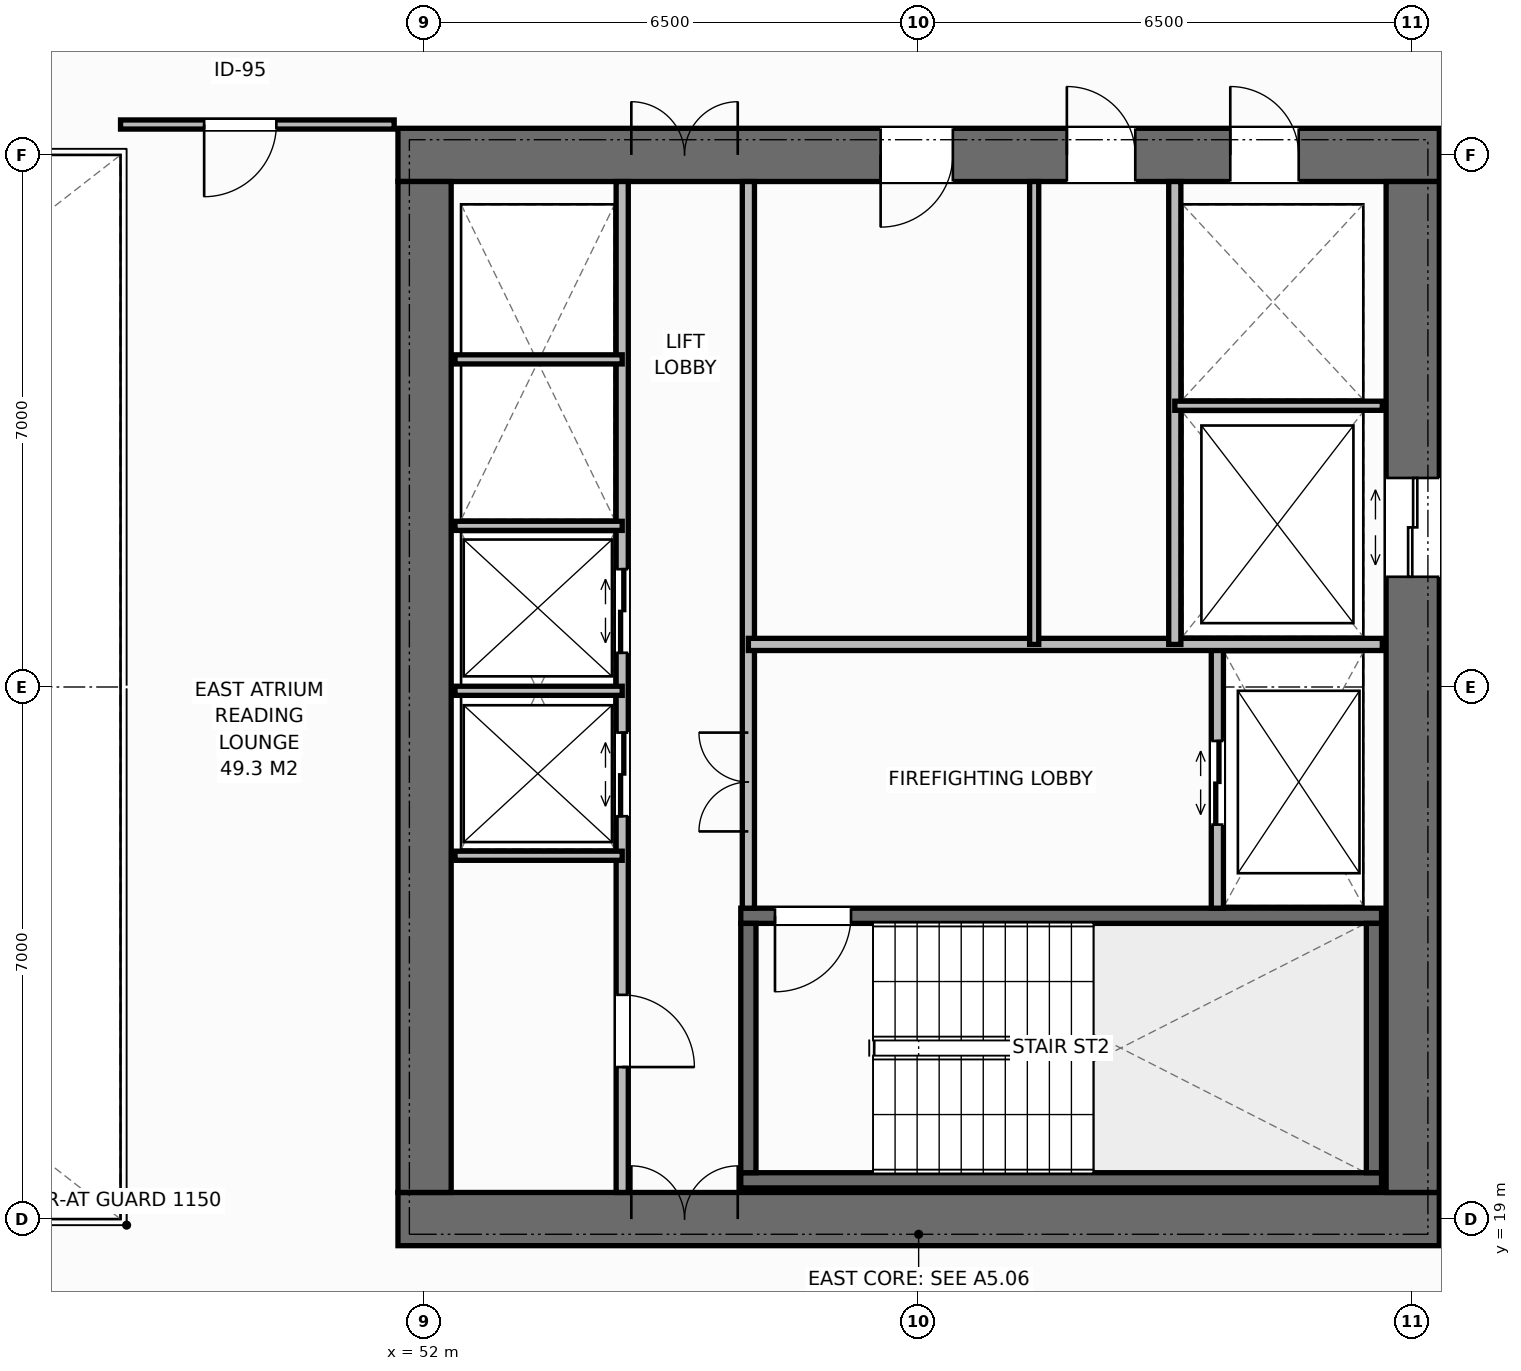
"""IFC4 building model, lengths in metres.
Left out: names, types, materials, properties, quantities, classifications, styles, units other than length and angle.
Written with IfcOpenShell. Run it as: python <this file> out.ifc"""

import sys

from ifc_helpers import new_model, si_unit, direction, frame, frame_2d, origin, place, context, subcontext, project, spatial, rectangle, extrude, element, fill, save


model = new_model("IFC4")
c1 = context("Model", 3, precision=1e-05, world=origin(), true_north=direction((0.0, 1.0)))
c2 = subcontext(c1, "Body", "Model", "MODEL_VIEW")
j1 = project(units=[si_unit("LENGTHUNIT", "METRE"), si_unit("PLANEANGLEUNIT", "RADIAN")], contexts=[c1])
p1 = place(None, origin())
s1 = spatial("IfcSite", under=j1, at=p1, CompositionType="ELEMENT")
p2 = place(p1, origin())
s2 = spatial("IfcBuilding", under=s1, at=p2, CompositionType="ELEMENT")
p3 = place(p2, frame((0.0, 0.0, 120.2)))
s3 = spatial("IfcBuildingStorey", under=s2, at=p3, CompositionType="ELEMENT", Elevation=120.2)
p4 = place(p3, frame((51.65, 19.0, 0.0), z_axis=(0.0, 0.0, 1.0), x_axis=(1.0, 0.0, 0.0)))
e1 = element("IfcWall", 1, at=p4, inside=s3, PredefinedType="SHEAR", context=c2, shape_type="SweptSolid", body=[
    extrude(rectangle(XDim=13.7, YDim=0.7, at=frame_2d((6.85, 0.0))), origin(), (0.0, 0.0, 1.0), 3.8),
])
p5 = place(p4, frame((3.07, 0.0, 0.0)))
e2 = element("IfcOpeningElement", 2, at=p5, cuts=e1, PredefinedType="OPENING", context=c2, shape_type="SweptSolid", body=[
    extrude(rectangle(XDim=1.4, YDim=2.2, at=frame_2d((0.7, 1.1))), frame((0.0, 0.36, 0.0), z_axis=(0.0, -1.0, 0.0), x_axis=(1.0, 0.0, 0.0)), (0.0, 0.0, 1.0), 0.72),
])
p6 = place(p3, frame((51.65, 33.0, 0.0), z_axis=(0.0, 0.0, 1.0), x_axis=(1.0, 0.0, 0.0)))
e3 = element("IfcWall", 3, at=p6, inside=s3, PredefinedType="SHEAR", context=c2, shape_type="SweptSolid", body=[
    extrude(rectangle(XDim=13.7, YDim=0.7, at=frame_2d((6.85, 0.0))), origin(), (0.0, 0.0, 1.0), 3.8),
])
p7 = place(p6, frame((3.07, 0.0, 0.0)))
e4 = element("IfcOpeningElement", 4, at=p7, cuts=e3, PredefinedType="OPENING", context=c2, shape_type="SweptSolid", body=[
    extrude(rectangle(XDim=1.4, YDim=2.2, at=frame_2d((0.7, 1.1))), frame((0.0, 0.36, 0.0), z_axis=(0.0, -1.0, 0.0), x_axis=(1.0, 0.0, 0.0)), (0.0, 0.0, 1.0), 0.72),
])
p8 = place(p6, frame((10.95, 0.0, 0.0)))
e5 = element("IfcOpeningElement", 5, at=p8, cuts=e3, PredefinedType="OPENING", context=c2, shape_type="SweptSolid", body=[
    extrude(rectangle(XDim=0.9, YDim=2.15, at=frame_2d((0.45, 1.075))), frame((0.0, 0.36, 0.0), z_axis=(0.0, -1.0, 0.0), x_axis=(1.0, 0.0, 0.0)), (0.0, 0.0, 1.0), 0.72),
])
p9 = place(p6, frame((6.35, 0.0, 0.0)))
e6 = element("IfcOpeningElement", 6, at=p9, cuts=e3, PredefinedType="OPENING", context=c2, shape_type="SweptSolid", body=[
    extrude(rectangle(XDim=0.95, YDim=2.15, at=frame_2d((0.475, 1.075))), frame((0.0, 0.36, 0.0), z_axis=(0.0, -1.0, 0.0), x_axis=(1.0, 0.0, 0.0)), (0.0, 0.0, 1.0), 0.72),
])
p10 = place(p6, frame((8.8, 0.0, 0.0)))
e7 = element("IfcOpeningElement", 7, at=p10, cuts=e3, PredefinedType="OPENING", context=c2, shape_type="SweptSolid", body=[
    extrude(rectangle(XDim=0.9, YDim=2.15, at=frame_2d((0.45, 1.075))), frame((0.0, 0.36, 0.0), z_axis=(0.0, -1.0, 0.0), x_axis=(1.0, 0.0, 0.0)), (0.0, 0.0, 1.0), 0.72),
])
p11 = place(p3, frame((52.0, 19.35, 0.0), z_axis=(0.0, 0.0, 1.0), x_axis=(0.0, 1.0, 0.0)))
e8 = element("IfcWall", 8, at=p11, inside=s3, PredefinedType="SHEAR", context=c2, shape_type="SweptSolid", body=[
    extrude(rectangle(XDim=13.3, YDim=0.7, at=frame_2d((6.65, 0.0))), origin(), (0.0, 0.0, 1.0), 3.8),
])
p12 = place(p3, frame((65.0, 19.35, 0.0), z_axis=(0.0, 0.0, 1.0), x_axis=(0.0, 1.0, 0.0)))
e9 = element("IfcWall", 9, at=p12, inside=s3, PredefinedType="SHEAR", context=c2, shape_type="SweptSolid", body=[
    extrude(rectangle(XDim=13.3, YDim=0.7, at=frame_2d((6.65, 0.0))), origin(), (0.0, 0.0, 1.0), 3.8),
])
p13 = place(p12, frame((8.1, 0.0, 0.0)))
e10 = element("IfcOpeningElement", 10, at=p13, cuts=e9, PredefinedType="OPENING", context=c2, shape_type="SweptSolid", body=[
    extrude(rectangle(XDim=1.3, YDim=2.2, at=frame_2d((0.65, 1.1))), frame((0.0, 0.36, 0.0), z_axis=(0.0, -1.0, 0.0), x_axis=(1.0, 0.0, 0.0)), (0.0, 0.0, 1.0), 0.72),
])
p14 = place(p3, frame((56.16, 19.51, 0.0), z_axis=(0.0, 0.0, 1.0), x_axis=(1.0, 0.0, 0.0)))
e11 = element("IfcWall", 11, at=p14, inside=s3, PredefinedType="SHEAR", context=c2, shape_type="SweptSolid", body=[
    extrude(rectangle(XDim=8.43, YDim=0.2, at=frame_2d((4.215, 0.0))), origin(), (0.0, 0.0, 1.0), 3.8),
])
p15 = place(p3, frame((56.16, 22.99, 0.0), z_axis=(0.0, 0.0, 1.0), x_axis=(1.0, 0.0, 0.0)))
e12 = element("IfcWall", 12, at=p15, inside=s3, PredefinedType="SHEAR", context=c2, shape_type="SweptSolid", body=[
    extrude(rectangle(XDim=8.43, YDim=0.2, at=frame_2d((4.215, 0.0))), origin(), (0.0, 0.0, 1.0), 3.8),
])
p16 = place(p15, frame((0.45, 0.0, 0.0)))
e13 = element("IfcOpeningElement", 13, at=p16, cuts=e12, PredefinedType="OPENING", context=c2, shape_type="SweptSolid", body=[
    extrude(rectangle(XDim=1.0, YDim=2.15, at=frame_2d((0.5, 1.075))), frame((0.0, 0.11, 0.0), z_axis=(0.0, -1.0, 0.0), x_axis=(1.0, 0.0, 0.0)), (0.0, 0.0, 1.0), 0.22),
])
for number, where, z_axis, x_axis in (
    (14, (56.26, 19.61, 0.0), (0.0, 0.0, 1.0), (0.0, 1.0, 0.0)),
    (15, (64.49, 19.61, 0.0), (0.0, 0.0, 1.0), (0.0, 1.0, 0.0)),
):
    element("IfcWall", number, at=place(p3, frame(where, z_axis=z_axis, x_axis=x_axis)), inside=s3, PredefinedType="SHEAR", context=c2, shape_type="SweptSolid", body=[
        extrude(rectangle(XDim=3.28, YDim=0.2, at=frame_2d((1.64, 0.0))), origin(), (0.0, 0.0, 1.0), 3.8),
    ])
p17 = place(p3, frame((54.6, 19.35, 0.0), z_axis=(0.0, 0.0, 1.0), x_axis=(0.0, 1.0, 0.0)))
e16 = element("IfcWall", 16, at=p17, inside=s3, PredefinedType="STANDARD", context=c2, shape_type="SweptSolid", body=[
    extrude(rectangle(XDim=13.3, YDim=0.16, at=frame_2d((6.65, 0.0))), origin(), (0.0, 0.0, 1.0), 3.565),
])
p18 = place(p17, frame((1.65, 0.0, 0.0)))
e17 = element("IfcOpeningElement", 17, at=p18, cuts=e16, PredefinedType="OPENING", context=c2, shape_type="SweptSolid", body=[
    extrude(rectangle(XDim=0.95, YDim=2.15, at=frame_2d((0.475, 1.075))), frame((0.0, 0.09, 0.0), z_axis=(0.0, -1.0, 0.0), x_axis=(1.0, 0.0, 0.0)), (0.0, 0.0, 1.0), 0.18),
])
p19 = place(p17, frame((4.95, 0.0, 0.0)))
e18 = element("IfcOpeningElement", 18, at=p19, cuts=e16, PredefinedType="OPENING", context=c2, shape_type="SweptSolid", body=[
    extrude(rectangle(XDim=1.1, YDim=2.2, at=frame_2d((0.55, 1.1))), frame((0.0, 0.09, 0.0), z_axis=(0.0, -1.0, 0.0), x_axis=(1.0, 0.0, 0.0)), (0.0, 0.0, 1.0), 0.18),
])
p20 = place(p17, frame((7.1, 0.0, 0.0)))
e19 = element("IfcOpeningElement", 19, at=p20, cuts=e16, PredefinedType="OPENING", context=c2, shape_type="SweptSolid", body=[
    extrude(rectangle(XDim=1.1, YDim=2.2, at=frame_2d((0.55, 1.1))), frame((0.0, 0.09, 0.0), z_axis=(0.0, -1.0, 0.0), x_axis=(1.0, 0.0, 0.0)), (0.0, 0.0, 1.0), 0.18),
])
p21 = place(p3, frame((56.26, 23.09, 0.0), z_axis=(0.0, 0.0, 1.0), x_axis=(0.0, 1.0, 0.0)))
e20 = element("IfcWall", 20, at=p21, inside=s3, PredefinedType="STANDARD", context=c2, shape_type="SweptSolid", body=[
    extrude(rectangle(XDim=9.56, YDim=0.16, at=frame_2d((4.78, 0.0))), origin(), (0.0, 0.0, 1.0), 3.565),
])
p22 = place(p21, frame((1.01, 0.0, 0.0)))
e21 = element("IfcOpeningElement", 21, at=p22, cuts=e20, PredefinedType="OPENING", context=c2, shape_type="SweptSolid", body=[
    extrude(rectangle(XDim=1.3, YDim=2.2, at=frame_2d((0.65, 1.1))), frame((0.0, 0.09, 0.0), z_axis=(0.0, -1.0, 0.0), x_axis=(1.0, 0.0, 0.0)), (0.0, 0.0, 1.0), 0.18),
])
for number, where, z_axis, x_axis in (
    (22, (52.4, 23.78, 0.0), (0.0, 0.0, 1.0), (1.0, 0.0, 0.0)),
    (23, (52.4, 25.95, 0.0), (0.0, 0.0, 1.0), (1.0, 0.0, 0.0)),
    (24, (52.4, 28.12, 0.0), (0.0, 0.0, 1.0), (1.0, 0.0, 0.0)),
    (25, (52.4, 30.31, 0.0), (0.0, 0.0, 1.0), (1.0, 0.0, 0.0)),
):
    element("IfcWall", number, at=place(p3, frame(where, z_axis=z_axis, x_axis=x_axis)), inside=s3, PredefinedType="PARTITIONING", context=c2, shape_type="SweptSolid", body=[
        extrude(rectangle(XDim=2.2, YDim=0.12, at=frame_2d((1.1, 0.0))), origin(), (0.0, 0.0, 1.0), 3.565),
    ])
p23 = place(p3, frame((62.43, 23.09, 0.0), z_axis=(0.0, 0.0, 1.0), x_axis=(0.0, 1.0, 0.0)))
e26 = element("IfcWall", 26, at=p23, inside=s3, PredefinedType="STANDARD", context=c2, shape_type="SweptSolid", body=[
    extrude(rectangle(XDim=3.47, YDim=0.16, at=frame_2d((1.735, 0.0))), origin(), (0.0, 0.0, 1.0), 3.565),
])
p24 = place(p23, frame((1.1, 0.0, 0.0)))
e27 = element("IfcOpeningElement", 27, at=p24, cuts=e26, PredefinedType="OPENING", context=c2, shape_type="SweptSolid", body=[
    extrude(rectangle(XDim=1.1, YDim=2.2, at=frame_2d((0.55, 1.1))), frame((0.0, 0.09, 0.0), z_axis=(0.0, -1.0, 0.0), x_axis=(1.0, 0.0, 0.0)), (0.0, 0.0, 1.0), 0.18),
])
p25 = place(p3, frame((56.26, 26.56, 0.0), z_axis=(0.0, 0.0, 1.0), x_axis=(1.0, 0.0, 0.0)))
e28 = element("IfcWall", 28, at=p25, inside=s3, PredefinedType="STANDARD", context=c2, shape_type="SweptSolid", body=[
    extrude(rectangle(XDim=8.34, YDim=0.16, at=frame_2d((4.17, 0.0))), origin(), (0.0, 0.0, 1.0), 3.565),
])
p26 = place(p3, frame((61.87, 26.56, 0.0), z_axis=(0.0, 0.0, 1.0), x_axis=(0.0, 1.0, 0.0)))
e29 = element("IfcWall", 29, at=p26, inside=s3, PredefinedType="STANDARD", context=c2, shape_type="SweptSolid", body=[
    extrude(rectangle(XDim=6.09, YDim=0.16, at=frame_2d((3.045, 0.0))), origin(), (0.0, 0.0, 1.0), 3.565),
])
p27 = place(p3, frame((61.87, 29.7, 0.0), z_axis=(0.0, 0.0, 1.0), x_axis=(1.0, 0.0, 0.0)))
e30 = element("IfcWall", 30, at=p27, inside=s3, PredefinedType="PARTITIONING", context=c2, shape_type="SweptSolid", body=[
    extrude(rectangle(XDim=2.73, YDim=0.12, at=frame_2d((1.365, 0.0))), origin(), (0.0, 0.0, 1.0), 3.565),
])
p28 = place(p3, frame((60.02, 26.56, 0.0), z_axis=(0.0, 0.0, 1.0), x_axis=(0.0, 1.0, 0.0)))
e31 = element("IfcWall", 31, at=p28, inside=s3, PredefinedType="PARTITIONING", context=c2, shape_type="SweptSolid", body=[
    extrude(rectangle(XDim=6.09, YDim=0.12, at=frame_2d((3.045, 0.0))), origin(), (0.0, 0.0, 1.0), 3.565),
])
p29 = place(p3, frame((48.0, 33.4, 0.0), z_axis=(0.0, 0.0, 1.0), x_axis=(1.0, 0.0, 0.0)))
e32 = element("IfcWall", 32, at=p29, inside=s3, PredefinedType="PARTITIONING", context=c2, shape_type="SweptSolid", body=[
    extrude(rectangle(XDim=3.6, YDim=0.12, at=frame_2d((1.8, 0.0))), origin(), (0.0, 0.0, 1.0), 3.565),
])
p30 = place(p29, frame((1.1, 0.0, 0.0)))
e33 = element("IfcOpeningElement", 33, at=p30, cuts=e32, PredefinedType="OPENING", context=c2, shape_type="SweptSolid", body=[
    extrude(rectangle(XDim=0.95, YDim=2.15, at=frame_2d((0.475, 1.075))), frame((0.0, 0.07, 0.0), z_axis=(0.0, -1.0, 0.0), x_axis=(1.0, 0.0, 0.0)), (0.0, 0.0, 1.0), 0.14),
])
p31 = place(p5, origin())
e34 = element("IfcDoor", 34, at=p31, inside=s3, OperationType="DOUBLE_DOOR_SINGLE_SWING", PredefinedType="DOOR", context=c2, shape_type="SweptSolid", body=[
    extrude(rectangle(XDim=1.4, YDim=2.2, at=frame_2d((0.7, 1.1))), frame((0.0, 0.125, 0.0), z_axis=(0.0, -1.0, 0.0), x_axis=(1.0, 0.0, 0.0)), (0.0, 0.0, 1.0), 0.05),
])
fill(e2, e34)
p32 = place(p7, origin())
e35 = element("IfcDoor", 35, at=p32, inside=s3, OperationType="DOUBLE_DOOR_SINGLE_SWING", PredefinedType="DOOR", context=c2, shape_type="SweptSolid", body=[
    extrude(rectangle(XDim=1.4, YDim=2.2, at=frame_2d((0.7, 1.1))), frame((0.0, -0.075, 0.0), z_axis=(0.0, -1.0, 0.0), x_axis=(1.0, 0.0, 0.0)), (0.0, 0.0, 1.0), 0.05),
])
fill(e4, e35)
p33 = place(p18, origin())
e36 = element("IfcDoor", 36, at=p33, inside=s3, OperationType="SINGLE_SWING_RIGHT", PredefinedType="DOOR", context=c2, shape_type="SweptSolid", body=[
    extrude(rectangle(XDim=0.95, YDim=2.15, at=frame_2d((0.475, 1.075))), frame((0.0, 0.025, 0.0), z_axis=(0.0, -1.0, 0.0), x_axis=(1.0, 0.0, 0.0)), (0.0, 0.0, 1.0), 0.05),
])
fill(e17, e36)
p34 = place(p19, origin())
e37 = element("IfcDoor", 37, at=p34, inside=s3, OperationType="DOUBLE_DOOR_SLIDING", PredefinedType="DOOR", context=c2, shape_type="SweptSolid", body=[
    extrude(rectangle(XDim=1.1, YDim=2.2, at=frame_2d((0.55, 1.1))), frame((0.0, 0.025, 0.0), z_axis=(0.0, -1.0, 0.0), x_axis=(1.0, 0.0, 0.0)), (0.0, 0.0, 1.0), 0.05),
])
fill(e18, e37)
p35 = place(p20, origin())
e38 = element("IfcDoor", 38, at=p35, inside=s3, OperationType="DOUBLE_DOOR_SLIDING", PredefinedType="DOOR", context=c2, shape_type="SweptSolid", body=[
    extrude(rectangle(XDim=1.1, YDim=2.2, at=frame_2d((0.55, 1.1))), frame((0.0, 0.025, 0.0), z_axis=(0.0, -1.0, 0.0), x_axis=(1.0, 0.0, 0.0)), (0.0, 0.0, 1.0), 0.05),
])
fill(e19, e38)
p36 = place(p16, origin())
e39 = element("IfcDoor", 39, at=p36, inside=s3, OperationType="SINGLE_SWING_RIGHT", PredefinedType="DOOR", context=c2, shape_type="SweptSolid", body=[
    extrude(rectangle(XDim=1.0, YDim=2.15, at=frame_2d((0.5, 1.075))), frame((0.0, 0.025, 0.0), z_axis=(0.0, -1.0, 0.0), x_axis=(1.0, 0.0, 0.0)), (0.0, 0.0, 1.0), 0.05),
])
fill(e13, e39)
p37 = place(p24, origin())
e40 = element("IfcDoor", 40, at=p37, inside=s3, OperationType="DOUBLE_DOOR_SLIDING", PredefinedType="DOOR", context=c2, shape_type="SweptSolid", body=[
    extrude(rectangle(XDim=1.1, YDim=2.2, at=frame_2d((0.55, 1.1))), frame((0.0, 0.025, 0.0), z_axis=(0.0, -1.0, 0.0), x_axis=(1.0, 0.0, 0.0)), (0.0, 0.0, 1.0), 0.05),
])
fill(e27, e40)
p38 = place(p22, origin())
e41 = element("IfcDoor", 41, at=p38, inside=s3, OperationType="DOUBLE_DOOR_SINGLE_SWING", PredefinedType="DOOR", context=c2, shape_type="SweptSolid", body=[
    extrude(rectangle(XDim=1.3, YDim=2.2, at=frame_2d((0.65, 1.1))), frame((0.0, 0.025, 0.0), z_axis=(0.0, -1.0, 0.0), x_axis=(1.0, 0.0, 0.0)), (0.0, 0.0, 1.0), 0.05),
])
fill(e21, e41)
p39 = place(p13, origin())
e42 = element("IfcDoor", 42, at=p39, inside=s3, OperationType="DOUBLE_DOOR_SLIDING", PredefinedType="DOOR", context=c2, shape_type="SweptSolid", body=[
    extrude(rectangle(XDim=1.3, YDim=2.2, at=frame_2d((0.65, 1.1))), frame((0.0, 0.025, 0.0), z_axis=(0.0, -1.0, 0.0), x_axis=(1.0, 0.0, 0.0)), (0.0, 0.0, 1.0), 0.05),
])
fill(e10, e42)
p40 = place(p8, origin())
e43 = element("IfcDoor", 43, at=p40, inside=s3, OperationType="SINGLE_SWING_LEFT", PredefinedType="DOOR", context=c2, shape_type="SweptSolid", body=[
    extrude(rectangle(XDim=0.9, YDim=2.15, at=frame_2d((0.45, 1.075))), frame((0.0, -0.075, 0.0), z_axis=(0.0, -1.0, 0.0), x_axis=(1.0, 0.0, 0.0)), (0.0, 0.0, 1.0), 0.05),
])
fill(e5, e43)
p41 = place(p9, origin())
e44 = element("IfcDoor", 44, at=p41, inside=s3, OperationType="SINGLE_SWING_RIGHT", PredefinedType="DOOR", context=c2, shape_type="SweptSolid", body=[
    extrude(rectangle(XDim=0.95, YDim=2.15, at=frame_2d((0.475, 1.075))), frame((0.0, -0.075, 0.0), z_axis=(0.0, -1.0, 0.0), x_axis=(1.0, 0.0, 0.0)), (0.0, 0.0, 1.0), 0.05),
])
fill(e6, e44)
p42 = place(p10, origin())
e45 = element("IfcDoor", 45, at=p42, inside=s3, OperationType="SINGLE_SWING_LEFT", PredefinedType="DOOR", context=c2, shape_type="SweptSolid", body=[
    extrude(rectangle(XDim=0.9, YDim=2.15, at=frame_2d((0.45, 1.075))), frame((0.0, -0.075, 0.0), z_axis=(0.0, -1.0, 0.0), x_axis=(1.0, 0.0, 0.0)), (0.0, 0.0, 1.0), 0.05),
])
fill(e7, e45)
p43 = place(p30, origin())
e46 = element("IfcDoor", 46, at=p43, inside=s3, OperationType="SINGLE_SWING_RIGHT", PredefinedType="DOOR", context=c2, shape_type="SweptSolid", body=[
    extrude(rectangle(XDim=0.95, YDim=2.15, at=frame_2d((0.475, 1.075))), frame((0.0, 0.025, 0.0), z_axis=(0.0, -1.0, 0.0), x_axis=(1.0, 0.0, 0.0)), (0.0, 0.0, 1.0), 0.05),
])
fill(e33, e46)
save(model, sys.argv[1])
